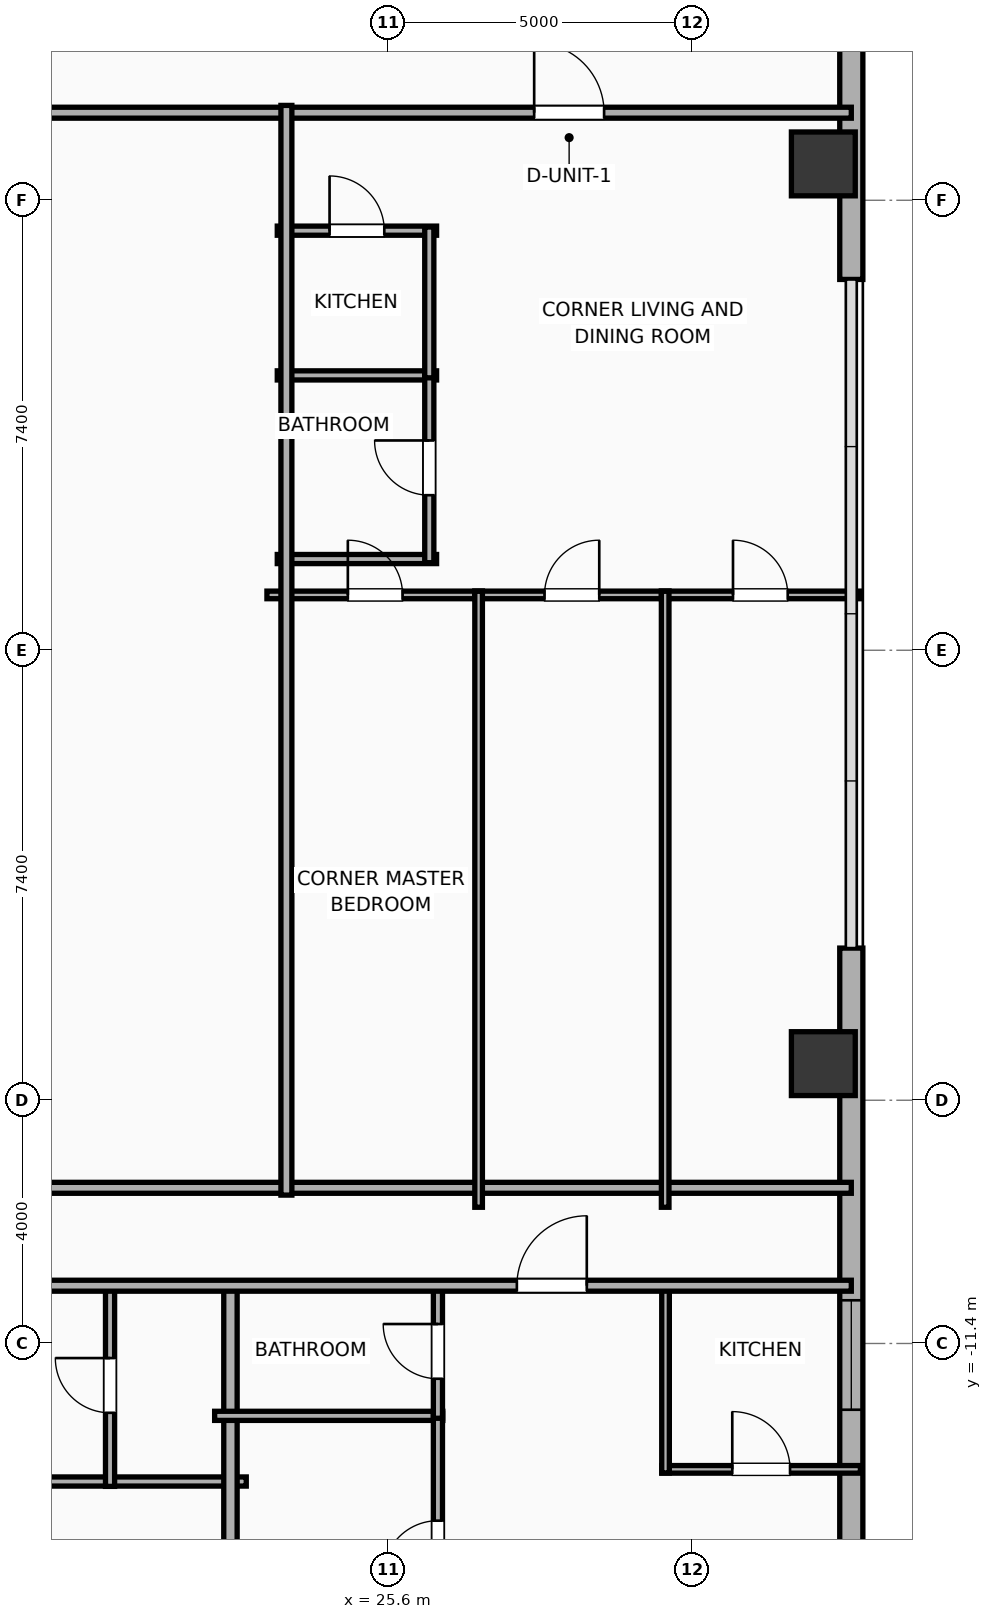
"""IFC4 building model, lengths in metres.
Left out: names, types, materials, properties, quantities, classifications, styles, units other than length and angle.
Written with IfcOpenShell. Run it as: python <this file> out.ifc"""

import sys

from ifc_helpers import new_model, si_unit, direction, frame, frame_2d, origin, origin_2d, place, context, subcontext, project, spatial, rectangle, hollow_rectangle, extrude, element, fill, save


model = new_model("IFC4")
c1 = context("Model", 3, precision=1e-05, world=origin(), true_north=direction((0.0, 1.0)))
c2 = subcontext(c1, "Body", "Model", "MODEL_VIEW")
j1 = project(units=[si_unit("LENGTHUNIT", "METRE"), si_unit("PLANEANGLEUNIT", "RADIAN")], contexts=[c1])
p1 = place(None, origin())
s1 = spatial("IfcSite", under=j1, at=p1, CompositionType="ELEMENT")
p2 = place(p1, origin())
s2 = spatial("IfcBuilding", under=s1, at=p2, CompositionType="ELEMENT")
p3 = place(p2, frame((0.0, 0.0, 117.0)))
s3 = spatial("IfcBuildingStorey", under=s2, at=p3, CompositionType="ELEMENT", Elevation=117.0)
for number, where, z_axis, x_axis in (
    (1, (32.75, -6.798, 0.0), (0.0, 0.0, 1.0), (1.0, 0.0, 0.0)),
    (2, (32.75, 7.998, 0.0), (0.0, 0.0, 1.0), (1.0, 0.0, 0.0)),
):
    element("IfcColumn", number, at=place(p3, frame(where, z_axis=z_axis, x_axis=x_axis)), inside=s3, PredefinedType="COLUMN", context=c2, shape_type="SweptSolid", body=[
        extrude(hollow_rectangle(XDim=1.05, YDim=1.05, WallThickness=0.036, at=origin_2d()), origin(), (0.0, 0.0, 1.0), 3.9),
    ])
p4 = place(p3, frame((33.21, 17.781, 0.0), z_axis=(0.0, 0.0, 1.0), x_axis=(0.0, -1.0, 0.0)))
e3 = element("IfcWall", 3, at=p4, inside=s3, PredefinedType="ELEMENTEDWALL", context=c2, shape_type="SweptSolid", body=[
    extrude(rectangle(XDim=11.683, YDim=0.38, at=frame_2d((5.842, 0.0))), origin(), (0.0, 0.0, 1.0), 3.65),
])
p5 = place(p4, frame((4.942, 0.0, 0.75)))
e4 = element("IfcOpeningElement", 4, at=p5, cuts=e3, PredefinedType="OPENING", context=c2, shape_type="SweptSolid", body=[
    extrude(rectangle(XDim=1.8, YDim=2.1, at=frame_2d((0.9, 1.05))), frame((0.0, 0.2, 0.0), z_axis=(0.0, -1.0, 0.0), x_axis=(1.0, 0.0, 0.0)), (0.0, 0.0, 1.0), 0.4),
])
p6 = place(p3, frame((33.21, -4.898, 0.0), z_axis=(0.0, 0.0, 1.0), x_axis=(0.0, -1.0, 0.0)))
e5 = element("IfcWall", 5, at=p6, inside=s3, PredefinedType="ELEMENTEDWALL", context=c2, shape_type="SweptSolid", body=[
    extrude(rectangle(XDim=11.683, YDim=0.38, at=frame_2d((5.842, 0.0))), origin(), (0.0, 0.0, 1.0), 3.65),
])
p7 = place(p6, frame((5.792, 0.0, 0.75)))
e6 = element("IfcOpeningElement", 6, at=p7, cuts=e5, PredefinedType="OPENING", context=c2, shape_type="SweptSolid", body=[
    extrude(rectangle(XDim=1.8, YDim=2.1, at=frame_2d((0.9, 1.05))), frame((0.0, 0.2, 0.0), z_axis=(0.0, -1.0, 0.0), x_axis=(1.0, 0.0, 0.0)), (0.0, 0.0, 1.0), 0.4),
])
p8 = place(p3, frame((9.88, 8.84, 0.0), z_axis=(0.0, 0.0, 1.0), x_axis=(1.0, 0.0, 0.0)))
e7 = element("IfcWall", 7, at=p8, inside=s3, PredefinedType="PARTITIONING", context=c2, shape_type="SweptSolid", body=[
    extrude(rectangle(XDim=23.33, YDim=0.18, at=frame_2d((11.665, 0.0))), origin(), (0.0, 0.0, 1.0), 3.65),
])
p9 = place(p8, frame((18.115, 0.0, 0.0)))
e8 = element("IfcOpeningElement", 8, at=p9, cuts=e7, PredefinedType="OPENING", context=c2, shape_type="SweptSolid", body=[
    extrude(rectangle(XDim=1.15, YDim=2.05, at=frame_2d((0.575, 1.025))), frame((0.0, 0.1, 0.0), z_axis=(0.0, -1.0, 0.0), x_axis=(1.0, 0.0, 0.0)), (0.0, 0.0, 1.0), 0.2),
])
p10 = place(p3, frame((9.88, -8.84, 0.0), z_axis=(0.0, 0.0, 1.0), x_axis=(1.0, 0.0, 0.0)))
e9 = element("IfcWall", 9, at=p10, inside=s3, PredefinedType="PARTITIONING", context=c2, shape_type="SweptSolid", body=[
    extrude(rectangle(XDim=23.33, YDim=0.18, at=frame_2d((11.665, 0.0))), origin(), (0.0, 0.0, 1.0), 3.65),
])
p11 = place(p3, frame((19.47, -13.67, 0.0), z_axis=(0.0, 0.0, 1.0), x_axis=(1.0, 0.0, 0.0)))
e10 = element("IfcWall", 10, at=p11, inside=s3, PredefinedType="PLUMBINGWALL", context=c2, shape_type="SweptSolid", body=[
    extrude(rectangle(XDim=3.79, YDim=0.15, at=frame_2d((1.895, 0.0))), origin(), (0.0, 0.0, 1.0), 3.65),
])
p12 = place(p3, frame((21.02, -13.75, 0.0), z_axis=(0.0, 0.0, 1.0), x_axis=(0.0, 1.0, 0.0)))
e11 = element("IfcWall", 11, at=p12, inside=s3, PredefinedType="PLUMBINGWALL", context=c2, shape_type="SweptSolid", body=[
    extrude(rectangle(XDim=3.32, YDim=0.15, at=frame_2d((1.66, 0.0))), origin(), (0.0, 0.0, 1.0), 3.65),
])
p13 = place(p12, frame((1.21, 0.0, 0.0)))
e12 = element("IfcOpeningElement", 12, at=p13, cuts=e11, PredefinedType="OPENING", context=c2, shape_type="SweptSolid", body=[
    extrude(rectangle(XDim=0.9, YDim=2.05, at=frame_2d((0.45, 1.025))), frame((0.0, 0.085, 0.0), z_axis=(0.0, -1.0, 0.0), x_axis=(1.0, 0.0, 0.0)), (0.0, 0.0, 1.0), 0.17),
])
p14 = place(p3, frame((23.0, -20.41, 0.0), z_axis=(0.0, 0.0, 1.0), x_axis=(0.0, 1.0, 0.0)))
e13 = element("IfcWall", 13, at=p14, inside=s3, PredefinedType="PARTITIONING", context=c2, shape_type="SweptSolid", body=[
    extrude(rectangle(XDim=10.04, YDim=0.22, at=frame_2d((5.02, 0.0))), origin(), (0.0, 0.0, 1.0), 3.65),
])
p15 = place(p3, frame((22.74, -12.59, 0.0), z_axis=(0.0, 0.0, 1.0), x_axis=(1.0, 0.0, 0.0)))
e14 = element("IfcWall", 14, at=p15, inside=s3, PredefinedType="PLUMBINGWALL", context=c2, shape_type="SweptSolid", body=[
    extrude(rectangle(XDim=3.752, YDim=0.15, at=frame_2d((1.876, 0.0))), origin(), (0.0, 0.0, 1.0), 3.65),
])
p16 = place(p3, frame((26.412, -20.458, 0.0), z_axis=(0.0, 0.0, 1.0), x_axis=(0.0, 1.0, 0.0)))
e15 = element("IfcWall", 15, at=p16, inside=s3, PredefinedType="PLUMBINGWALL", context=c2, shape_type="SweptSolid", body=[
    extrude(rectangle(XDim=7.907, YDim=0.15, at=frame_2d((3.954, 0.0))), origin(), (0.0, 0.0, 1.0), 3.65),
])
p17 = place(p16, frame((5.243, 0.0, 0.0)))
e16 = element("IfcOpeningElement", 16, at=p17, cuts=e15, PredefinedType="OPENING", context=c2, shape_type="SweptSolid", body=[
    extrude(rectangle(XDim=0.9, YDim=2.05, at=frame_2d((0.45, 1.025))), frame((0.0, 0.085, 0.0), z_axis=(0.0, -1.0, 0.0), x_axis=(1.0, 0.0, 0.0)), (0.0, 0.0, 1.0), 0.17),
])
p18 = place(p3, frame((26.412, -12.63, 0.0), z_axis=(0.0, 0.0, 1.0), x_axis=(0.0, 1.0, 0.0)))
e17 = element("IfcWall", 17, at=p18, inside=s3, PredefinedType="PLUMBINGWALL", context=c2, shape_type="SweptSolid", body=[
    extrude(rectangle(XDim=2.2, YDim=0.15, at=frame_2d((1.1, 0.0))), origin(), (0.0, 0.0, 1.0), 3.65),
])
p19 = place(p18, frame((0.65, 0.0, 0.0)))
e18 = element("IfcOpeningElement", 18, at=p19, cuts=e17, PredefinedType="OPENING", context=c2, shape_type="SweptSolid", body=[
    extrude(rectangle(XDim=0.9, YDim=2.05, at=frame_2d((0.45, 1.025))), frame((0.0, 0.085, 0.0), z_axis=(0.0, -1.0, 0.0), x_axis=(1.0, 0.0, 0.0)), (0.0, 0.0, 1.0), 0.17),
])
p20 = place(p3, frame((30.095, -13.47, 0.0), z_axis=(0.0, 0.0, 1.0), x_axis=(1.0, 0.0, 0.0)))
e19 = element("IfcWall", 19, at=p20, inside=s3, PredefinedType="PARTITIONING", context=c2, shape_type="SweptSolid", body=[
    extrude(rectangle(XDim=3.265, YDim=0.125, at=frame_2d((1.633, 0.0))), origin(), (0.0, 0.0, 1.0), 3.65),
])
p21 = place(p20, frame((1.157, 0.0, 0.0)))
e20 = element("IfcOpeningElement", 20, at=p21, cuts=e19, PredefinedType="OPENING", context=c2, shape_type="SweptSolid", body=[
    extrude(rectangle(XDim=0.95, YDim=2.05, at=frame_2d((0.475, 1.025))), frame((0.0, 0.073, 0.0), z_axis=(0.0, -1.0, 0.0), x_axis=(1.0, 0.0, 0.0)), (0.0, 0.0, 1.0), 0.145),
])
p22 = place(p3, frame((30.155, -13.53, 0.0), z_axis=(0.0, 0.0, 1.0), x_axis=(0.0, 1.0, 0.0)))
e21 = element("IfcWall", 21, at=p22, inside=s3, PredefinedType="PARTITIONING", context=c2, shape_type="SweptSolid", body=[
    extrude(rectangle(XDim=3.1, YDim=0.125, at=frame_2d((1.55, 0.0))), origin(), (0.0, 0.0, 1.0), 3.65),
])
p23 = place(p3, frame((-29.21, -10.45, 0.0), z_axis=(0.0, 0.0, 1.0), x_axis=(1.0, 0.0, 0.0)))
e22 = element("IfcWall", 22, at=p23, inside=s3, PredefinedType="PARTITIONING", context=c2, shape_type="SweptSolid", body=[
    extrude(rectangle(XDim=62.42, YDim=0.18, at=frame_2d((31.21, 0.0))), origin(), (0.0, 0.0, 1.0), 3.65),
])
p24 = place(p23, frame((3.813, 0.0, 0.0)))
e23 = element("IfcOpeningElement", 23, at=p24, cuts=e22, PredefinedType="OPENING", context=c2, shape_type="SweptSolid", body=[
    extrude(rectangle(XDim=1.15, YDim=2.05, at=frame_2d((0.575, 1.025))), frame((0.0, 0.1, 0.0), z_axis=(0.0, -1.0, 0.0), x_axis=(1.0, 0.0, 0.0)), (0.0, 0.0, 1.0), 0.2),
])
p25 = place(p23, frame((12.271, 0.0, 0.0)))
e24 = element("IfcOpeningElement", 24, at=p25, cuts=e22, PredefinedType="OPENING", context=c2, shape_type="SweptSolid", body=[
    extrude(rectangle(XDim=1.15, YDim=2.05, at=frame_2d((0.575, 1.025))), frame((0.0, 0.1, 0.0), z_axis=(0.0, -1.0, 0.0), x_axis=(1.0, 0.0, 0.0)), (0.0, 0.0, 1.0), 0.2),
])
p26 = place(p23, frame((20.804, 0.0, 0.0)))
e25 = element("IfcOpeningElement", 25, at=p26, cuts=e22, PredefinedType="OPENING", context=c2, shape_type="SweptSolid", body=[
    extrude(rectangle(XDim=1.15, YDim=2.05, at=frame_2d((0.575, 1.025))), frame((0.0, 0.1, 0.0), z_axis=(0.0, -1.0, 0.0), x_axis=(1.0, 0.0, 0.0)), (0.0, 0.0, 1.0), 0.2),
])
p27 = place(p23, frame((29.848, 0.0, 0.0)))
e26 = element("IfcOpeningElement", 26, at=p27, cuts=e22, PredefinedType="OPENING", context=c2, shape_type="SweptSolid", body=[
    extrude(rectangle(XDim=1.15, YDim=2.05, at=frame_2d((0.575, 1.025))), frame((0.0, 0.1, 0.0), z_axis=(0.0, -1.0, 0.0), x_axis=(1.0, 0.0, 0.0)), (0.0, 0.0, 1.0), 0.2),
])
p28 = place(p23, frame((38.45, 0.0, 0.0)))
e27 = element("IfcOpeningElement", 27, at=p28, cuts=e22, PredefinedType="OPENING", context=c2, shape_type="SweptSolid", body=[
    extrude(rectangle(XDim=1.15, YDim=2.05, at=frame_2d((0.575, 1.025))), frame((0.0, 0.1, 0.0), z_axis=(0.0, -1.0, 0.0), x_axis=(1.0, 0.0, 0.0)), (0.0, 0.0, 1.0), 0.2),
])
p29 = place(p23, frame((47.42, 0.0, 0.0)))
e28 = element("IfcOpeningElement", 28, at=p29, cuts=e22, PredefinedType="OPENING", context=c2, shape_type="SweptSolid", body=[
    extrude(rectangle(XDim=1.15, YDim=2.05, at=frame_2d((0.575, 1.025))), frame((0.0, 0.1, 0.0), z_axis=(0.0, -1.0, 0.0), x_axis=(1.0, 0.0, 0.0)), (0.0, 0.0, 1.0), 0.2),
])
p30 = place(p23, frame((56.92, 0.0, 0.0)))
e29 = element("IfcOpeningElement", 29, at=p30, cuts=e22, PredefinedType="OPENING", context=c2, shape_type="SweptSolid", body=[
    extrude(rectangle(XDim=1.15, YDim=2.05, at=frame_2d((0.575, 1.025))), frame((0.0, 0.1, 0.0), z_axis=(0.0, -1.0, 0.0), x_axis=(1.0, 0.0, 0.0)), (0.0, 0.0, 1.0), 0.2),
])
p31 = place(p3, frame((23.77, 6.9, 0.0), z_axis=(0.0, 0.0, 1.0), x_axis=(1.0, 0.0, 0.0)))
e30 = element("IfcWall", 30, at=p31, inside=s3, PredefinedType="PLUMBINGWALL", context=c2, shape_type="SweptSolid", body=[
    extrude(rectangle(XDim=2.62, YDim=0.15, at=frame_2d((1.31, 0.0))), origin(), (0.0, 0.0, 1.0), 3.65),
])
p32 = place(p31, frame((0.86, 0.0, 0.0)))
e31 = element("IfcOpeningElement", 31, at=p32, cuts=e30, PredefinedType="OPENING", context=c2, shape_type="SweptSolid", body=[
    extrude(rectangle(XDim=0.9, YDim=2.05, at=frame_2d((0.45, 1.025))), frame((0.0, 0.085, 0.0), z_axis=(0.0, -1.0, 0.0), x_axis=(1.0, 0.0, 0.0)), (0.0, 0.0, 1.0), 0.17),
])
for number, where, z_axis, x_axis in (
    (32, (23.77, 4.52, 0.0), (0.0, 0.0, 1.0), (1.0, 0.0, 0.0)),
    (33, (23.77, 1.5, 0.0), (0.0, 0.0, 1.0), (1.0, 0.0, 0.0)),
):
    element("IfcWall", number, at=place(p3, frame(where, z_axis=z_axis, x_axis=x_axis)), inside=s3, PredefinedType="PLUMBINGWALL", context=c2, shape_type="SweptSolid", body=[
        extrude(rectangle(XDim=2.62, YDim=0.15, at=frame_2d((1.31, 0.0))), origin(), (0.0, 0.0, 1.0), 3.65),
    ])
p33 = place(p3, frame((26.27, 1.44, 0.0), z_axis=(0.0, 0.0, 1.0), x_axis=(0.0, 1.0, 0.0)))
e34 = element("IfcWall", 34, at=p33, inside=s3, PredefinedType="PLUMBINGWALL", context=c2, shape_type="SweptSolid", body=[
    extrude(rectangle(XDim=3.12, YDim=0.15, at=frame_2d((1.56, 0.0))), origin(), (0.0, 0.0, 1.0), 3.65),
])
p34 = place(p33, frame((1.11, 0.0, 0.0)))
e35 = element("IfcOpeningElement", 35, at=p34, cuts=e34, PredefinedType="OPENING", context=c2, shape_type="SweptSolid", body=[
    extrude(rectangle(XDim=0.9, YDim=2.05, at=frame_2d((0.45, 1.025))), frame((0.0, 0.085, 0.0), z_axis=(0.0, -1.0, 0.0), x_axis=(1.0, 0.0, 0.0)), (0.0, 0.0, 1.0), 0.17),
])
p35 = place(p3, frame((26.27, 4.48, 0.0), z_axis=(0.0, 0.0, 1.0), x_axis=(0.0, 1.0, 0.0)))
e36 = element("IfcWall", 36, at=p35, inside=s3, PredefinedType="PLUMBINGWALL", context=c2, shape_type="SweptSolid", body=[
    extrude(rectangle(XDim=2.48, YDim=0.15, at=frame_2d((1.24, 0.0))), origin(), (0.0, 0.0, 1.0), 3.65),
])
p36 = place(p3, frame((23.6, 0.91, 0.0), z_axis=(0.0, 0.0, 1.0), x_axis=(1.0, 0.0, 0.0)))
e37 = element("IfcWall", 37, at=p36, inside=s3, PredefinedType="PARTITIONING", context=c2, shape_type="SweptSolid", body=[
    extrude(rectangle(XDim=3.543, YDim=0.125, at=frame_2d((1.772, 0.0))), origin(), (0.0, 0.0, 1.0), 3.65),
])
p37 = place(p36, frame((1.331, 0.0, 0.0)))
e38 = element("IfcOpeningElement", 38, at=p37, cuts=e37, PredefinedType="OPENING", context=c2, shape_type="SweptSolid", body=[
    extrude(rectangle(XDim=0.9, YDim=2.05, at=frame_2d((0.45, 1.025))), frame((0.0, 0.073, 0.0), z_axis=(0.0, -1.0, 0.0), x_axis=(1.0, 0.0, 0.0)), (0.0, 0.0, 1.0), 0.145),
])
p38 = place(p3, frame((27.019, 0.91, 0.0), z_axis=(0.0, 0.0, 1.0), x_axis=(1.0, 0.0, 0.0)))
e39 = element("IfcWall", 39, at=p38, inside=s3, PredefinedType="PARTITIONING", context=c2, shape_type="SweptSolid", body=[
    extrude(rectangle(XDim=3.193, YDim=0.125, at=frame_2d((1.596, 0.0))), origin(), (0.0, 0.0, 1.0), 3.65),
])
p39 = place(p38, frame((1.146, 0.0, 0.0)))
e40 = element("IfcOpeningElement", 40, at=p39, cuts=e39, PredefinedType="OPENING", context=c2, shape_type="SweptSolid", body=[
    extrude(rectangle(XDim=0.9, YDim=2.05, at=frame_2d((0.45, 1.025))), frame((0.0, 0.073, 0.0), z_axis=(0.0, -1.0, 0.0), x_axis=(1.0, 0.0, 0.0)), (0.0, 0.0, 1.0), 0.145),
])
p40 = place(p3, frame((30.086, 0.91, 0.0), z_axis=(0.0, 0.0, 1.0), x_axis=(1.0, 0.0, 0.0)))
e41 = element("IfcWall", 41, at=p40, inside=s3, PredefinedType="PARTITIONING", context=c2, shape_type="SweptSolid", body=[
    extrude(rectangle(XDim=3.274, YDim=0.125, at=frame_2d((1.637, 0.0))), origin(), (0.0, 0.0, 1.0), 3.65),
])
p41 = place(p40, frame((1.178, 0.0, 0.0)))
e42 = element("IfcOpeningElement", 42, at=p41, cuts=e41, PredefinedType="OPENING", context=c2, shape_type="SweptSolid", body=[
    extrude(rectangle(XDim=0.9, YDim=2.05, at=frame_2d((0.45, 1.025))), frame((0.0, 0.073, 0.0), z_axis=(0.0, -1.0, 0.0), x_axis=(1.0, 0.0, 0.0)), (0.0, 0.0, 1.0), 0.145),
])
for number, where, z_axis, x_axis in (
    (43, (30.149, -9.16, 0.0), (0.0, 0.0, 1.0), (0.0, 1.0, 0.0)),
    (44, (27.081, -9.16, 0.0), (0.0, 0.0, 1.0), (0.0, 1.0, 0.0)),
):
    element("IfcWall", number, at=place(p3, frame(where, z_axis=z_axis, x_axis=x_axis)), inside=s3, PredefinedType="PARTITIONING", context=c2, shape_type="SweptSolid", body=[
        extrude(rectangle(XDim=10.13, YDim=0.125, at=frame_2d((5.065, 0.0))), origin(), (0.0, 0.0, 1.0), 3.65),
    ])
p42 = place(p3, frame((23.92, -8.96, 0.0), z_axis=(0.0, 0.0, 1.0), x_axis=(0.0, 1.0, 0.0)))
e45 = element("IfcWall", 45, at=p42, inside=s3, PredefinedType="PARTITIONING", context=c2, shape_type="SweptSolid", body=[
    extrude(rectangle(XDim=17.92, YDim=0.18, at=frame_2d((8.96, 0.0))), origin(), (0.0, 0.0, 1.0), 3.65),
])
p43 = place(p7, origin())
e46 = element("IfcWindow", 46, at=p43, inside=s3, PartitioningType="SINGLE_PANEL", PredefinedType="WINDOW", context=c2, shape_type="SweptSolid", body=[
    extrude(rectangle(XDim=1.8, YDim=2.1, at=frame_2d((0.9, 1.05))), frame((0.0, 0.03, 0.0), z_axis=(0.0, -1.0, 0.0), x_axis=(1.0, 0.0, 0.0)), (0.0, 0.0, 1.0), 0.06),
])
fill(e6, e46)
p44 = place(p9, origin())
e47 = element("IfcDoor", 47, at=p44, inside=s3, OperationType="SINGLE_SWING_LEFT", PredefinedType="DOOR", context=c2, shape_type="SweptSolid", body=[
    extrude(rectangle(XDim=1.15, YDim=2.05, at=frame_2d((0.575, 1.025))), frame((0.0, 0.025, 0.0), z_axis=(0.0, -1.0, 0.0), x_axis=(1.0, 0.0, 0.0)), (0.0, 0.0, 1.0), 0.05),
])
fill(e8, e47)
p45 = place(p13, origin())
e48 = element("IfcDoor", 48, at=p45, inside=s3, OperationType="SINGLE_SWING_RIGHT", PredefinedType="DOOR", context=c2, shape_type="SweptSolid", body=[
    extrude(rectangle(XDim=0.9, YDim=2.05, at=frame_2d((0.45, 1.025))), frame((0.0, 0.025, 0.0), z_axis=(0.0, -1.0, 0.0), x_axis=(1.0, 0.0, 0.0)), (0.0, 0.0, 1.0), 0.05),
])
fill(e12, e48)
p46 = place(p17, origin())
e49 = element("IfcDoor", 49, at=p46, inside=s3, OperationType="SINGLE_SWING_LEFT", PredefinedType="DOOR", context=c2, shape_type="SweptSolid", body=[
    extrude(rectangle(XDim=0.9, YDim=2.05, at=frame_2d((0.45, 1.025))), frame((0.0, 0.025, 0.0), z_axis=(0.0, -1.0, 0.0), x_axis=(1.0, 0.0, 0.0)), (0.0, 0.0, 1.0), 0.05),
])
fill(e16, e49)
p47 = place(p19, origin())
e50 = element("IfcDoor", 50, at=p47, inside=s3, OperationType="SINGLE_SWING_RIGHT", PredefinedType="DOOR", context=c2, shape_type="SweptSolid", body=[
    extrude(rectangle(XDim=0.9, YDim=2.05, at=frame_2d((0.45, 1.025))), frame((0.0, 0.025, 0.0), z_axis=(0.0, -1.0, 0.0), x_axis=(1.0, 0.0, 0.0)), (0.0, 0.0, 1.0), 0.05),
])
fill(e18, e50)
p48 = place(p21, origin())
e51 = element("IfcDoor", 51, at=p48, inside=s3, OperationType="SINGLE_SWING_LEFT", PredefinedType="DOOR", context=c2, shape_type="SweptSolid", body=[
    extrude(rectangle(XDim=0.95, YDim=2.05, at=frame_2d((0.475, 1.025))), frame((0.0, 0.025, 0.0), z_axis=(0.0, -1.0, 0.0), x_axis=(1.0, 0.0, 0.0)), (0.0, 0.0, 1.0), 0.05),
])
fill(e20, e51)
p49 = place(p30, origin())
e52 = element("IfcDoor", 52, at=p49, inside=s3, OperationType="SINGLE_SWING_RIGHT", PredefinedType="DOOR", context=c2, shape_type="SweptSolid", body=[
    extrude(rectangle(XDim=1.15, YDim=2.05, at=frame_2d((0.575, 1.025))), frame((0.0, 0.025, 0.0), z_axis=(0.0, -1.0, 0.0), x_axis=(1.0, 0.0, 0.0)), (0.0, 0.0, 1.0), 0.05),
])
fill(e29, e52)
p50 = place(p32, origin())
e53 = element("IfcDoor", 53, at=p50, inside=s3, OperationType="SINGLE_SWING_LEFT", PredefinedType="DOOR", context=c2, shape_type="SweptSolid", body=[
    extrude(rectangle(XDim=0.9, YDim=2.05, at=frame_2d((0.45, 1.025))), frame((0.0, 0.025, 0.0), z_axis=(0.0, -1.0, 0.0), x_axis=(1.0, 0.0, 0.0)), (0.0, 0.0, 1.0), 0.05),
])
fill(e31, e53)
p51 = place(p34, origin())
e54 = element("IfcDoor", 54, at=p51, inside=s3, OperationType="SINGLE_SWING_RIGHT", PredefinedType="DOOR", context=c2, shape_type="SweptSolid", body=[
    extrude(rectangle(XDim=0.9, YDim=2.05, at=frame_2d((0.45, 1.025))), frame((0.0, 0.025, 0.0), z_axis=(0.0, -1.0, 0.0), x_axis=(1.0, 0.0, 0.0)), (0.0, 0.0, 1.0), 0.05),
])
fill(e35, e54)
p52 = place(p37, origin())
e55 = element("IfcDoor", 55, at=p52, inside=s3, OperationType="SINGLE_SWING_LEFT", PredefinedType="DOOR", context=c2, shape_type="SweptSolid", body=[
    extrude(rectangle(XDim=0.9, YDim=2.05, at=frame_2d((0.45, 1.025))), frame((0.0, 0.025, 0.0), z_axis=(0.0, -1.0, 0.0), x_axis=(1.0, 0.0, 0.0)), (0.0, 0.0, 1.0), 0.05),
])
fill(e38, e55)
p53 = place(p39, origin())
e56 = element("IfcDoor", 56, at=p53, inside=s3, OperationType="SINGLE_SWING_RIGHT", PredefinedType="DOOR", context=c2, shape_type="SweptSolid", body=[
    extrude(rectangle(XDim=0.9, YDim=2.05, at=frame_2d((0.45, 1.025))), frame((0.0, 0.025, 0.0), z_axis=(0.0, -1.0, 0.0), x_axis=(1.0, 0.0, 0.0)), (0.0, 0.0, 1.0), 0.05),
])
fill(e40, e56)
p54 = place(p41, origin())
e57 = element("IfcDoor", 57, at=p54, inside=s3, OperationType="SINGLE_SWING_LEFT", PredefinedType="DOOR", context=c2, shape_type="SweptSolid", body=[
    extrude(rectangle(XDim=0.9, YDim=2.05, at=frame_2d((0.45, 1.025))), frame((0.0, 0.025, 0.0), z_axis=(0.0, -1.0, 0.0), x_axis=(1.0, 0.0, 0.0)), (0.0, 0.0, 1.0), 0.05),
])
fill(e42, e57)
save(model, sys.argv[1])
